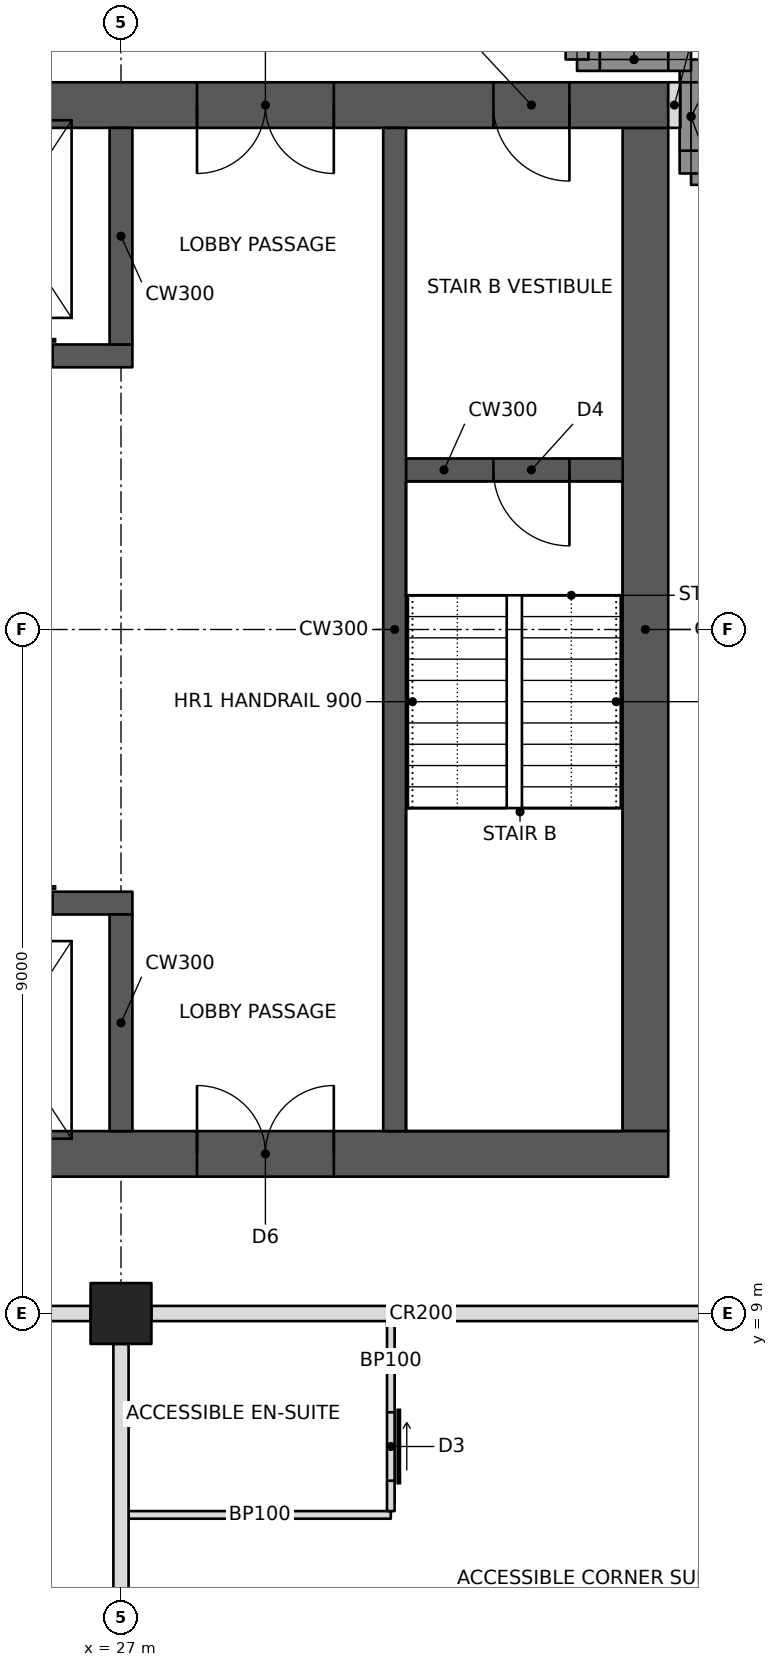
"""IFC4 building model, lengths in metres.
Left out: names, types, materials, properties, quantities, classifications, styles, units other than length and angle.
Written with IfcOpenShell. Run it as: python <this file> out.ifc"""

import sys

from ifc_helpers import new_model, si_unit, direction, frame, frame_2d, origin, origin_2d, place, context, subcontext, project, spatial, rectangle, hollow_rectangle, extrude, element, fill, save


model = new_model("IFC4")
c1 = context("Model", 3, precision=1e-05, world=origin(), true_north=direction((0.0, 1.0)))
c2 = subcontext(c1, "Body", "Model", "MODEL_VIEW")
j1 = project(units=[si_unit("LENGTHUNIT", "METRE"), si_unit("PLANEANGLEUNIT", "RADIAN")], contexts=[c1])
p1 = place(None, origin())
s1 = spatial("IfcSite", under=j1, at=p1, CompositionType="ELEMENT")
p2 = place(p1, origin())
s2 = spatial("IfcBuilding", under=s1, at=p2, CompositionType="ELEMENT")
p3 = place(p2, frame((0.0, 0.0, 266.2)))
s3 = spatial("IfcBuildingStorey", under=s2, at=p3, CompositionType="ELEMENT", Elevation=266.2)
p4 = place(p3, frame((27.0, 9.0, 0.0), z_axis=(0.0, 0.0, 1.0), x_axis=(1.0, 0.0, 0.0)))
e1 = element("IfcColumn", 1, at=p4, inside=s3, PredefinedType="COLUMN", context=c2, shape_type="SweptSolid", body=[
    extrude(hollow_rectangle(XDim=0.8, YDim=0.8, WallThickness=0.032, at=origin_2d()), origin(), (0.0, 0.0, 1.0), 3.6),
])
p5 = place(p3, frame((10.8, 11.1, 0.0), z_axis=(0.0, 0.0, 1.0), x_axis=(1.0, 0.0, 0.0)))
e2 = element("IfcWall", 2, at=p5, inside=s3, PredefinedType="SHEAR", context=c2, shape_type="SweptSolid", body=[
    extrude(rectangle(XDim=23.4, YDim=0.6, at=frame_2d((11.7, 0.0))), origin(), (0.0, 0.0, 1.0), 3.6),
])
p6 = place(p5, frame((1.0, 0.0, 0.0)))
e3 = element("IfcOpeningElement", 3, at=p6, cuts=e2, PredefinedType="OPENING", context=c2, shape_type="SweptSolid", body=[
    extrude(rectangle(XDim=1.0, YDim=2.1, at=frame_2d((0.5, 1.05))), frame((0.0, 0.31, 0.0), z_axis=(0.0, -1.0, 0.0), x_axis=(1.0, 0.0, 0.0)), (0.0, 0.0, 1.0), 0.62),
])
p7 = place(p5, frame((17.2, 0.0, 0.0)))
e4 = element("IfcOpeningElement", 4, at=p7, cuts=e2, PredefinedType="OPENING", context=c2, shape_type="SweptSolid", body=[
    extrude(rectangle(XDim=1.8, YDim=2.1, at=frame_2d((0.9, 1.05))), frame((0.0, 0.31, 0.0), z_axis=(0.0, -1.0, 0.0), x_axis=(1.0, 0.0, 0.0)), (0.0, 0.0, 1.0), 0.62),
])
p8 = place(p3, frame((10.8, 24.9, 0.0), z_axis=(0.0, 0.0, 1.0), x_axis=(1.0, 0.0, 0.0)))
e5 = element("IfcWall", 5, at=p8, inside=s3, PredefinedType="SHEAR", context=c2, shape_type="SweptSolid", body=[
    extrude(rectangle(XDim=23.4, YDim=0.6, at=frame_2d((11.7, 0.0))), origin(), (0.0, 0.0, 1.0), 3.6),
])
p9 = place(p8, frame((17.2, 0.0, 0.0)))
e6 = element("IfcOpeningElement", 6, at=p9, cuts=e5, PredefinedType="OPENING", context=c2, shape_type="SweptSolid", body=[
    extrude(rectangle(XDim=1.8, YDim=2.1, at=frame_2d((0.9, 1.05))), frame((0.0, 0.31, 0.0), z_axis=(0.0, -1.0, 0.0), x_axis=(1.0, 0.0, 0.0)), (0.0, 0.0, 1.0), 0.62),
])
p10 = place(p8, frame((21.1, 0.0, 0.0)))
e7 = element("IfcOpeningElement", 7, at=p10, cuts=e5, PredefinedType="OPENING", context=c2, shape_type="SweptSolid", body=[
    extrude(rectangle(XDim=1.0, YDim=2.1, at=frame_2d((0.5, 1.05))), frame((0.0, 0.31, 0.0), z_axis=(0.0, -1.0, 0.0), x_axis=(1.0, 0.0, 0.0)), (0.0, 0.0, 1.0), 0.62),
])
p11 = place(p8, frame((4.9, 0.0, 0.0)))
e8 = element("IfcOpeningElement", 8, at=p11, cuts=e5, PredefinedType="OPENING", context=c2, shape_type="SweptSolid", body=[
    extrude(rectangle(XDim=1.0, YDim=2.1, at=frame_2d((0.5, 1.05))), frame((0.0, 0.31, 0.0), z_axis=(0.0, -1.0, 0.0), x_axis=(1.0, 0.0, 0.0)), (0.0, 0.0, 1.0), 0.62),
])
p12 = place(p3, frame((33.9, 11.4, 0.0), z_axis=(0.0, 0.0, 1.0), x_axis=(0.0, 1.0, 0.0)))
e9 = element("IfcWall", 9, at=p12, inside=s3, PredefinedType="SHEAR", context=c2, shape_type="SweptSolid", body=[
    extrude(rectangle(XDim=13.2, YDim=0.6, at=frame_2d((6.6, 0.0))), origin(), (0.0, 0.0, 1.0), 3.6),
])
p13 = place(p3, frame((18.15, 14.4, 0.0), z_axis=(0.0, 0.0, 1.0), x_axis=(1.0, 0.0, 0.0)))
e10 = element("IfcWall", 10, at=p13, inside=s3, PredefinedType="SHEAR", context=c2, shape_type="SweptSolid", body=[
    extrude(rectangle(XDim=9.0, YDim=0.3, at=frame_2d((4.5, 0.0))), origin(), (0.0, 0.0, 1.0), 3.6),
])
p14 = place(p13, frame((0.8, 0.0, 0.0)))
e11 = element("IfcOpeningElement", 11, at=p14, cuts=e10, PredefinedType="OPENING", context=c2, shape_type="SweptSolid", body=[
    extrude(rectangle(XDim=1.1, YDim=2.1, at=frame_2d((0.55, 1.05))), frame((0.0, 0.16, 0.0), z_axis=(0.0, -1.0, 0.0), x_axis=(1.0, 0.0, 0.0)), (0.0, 0.0, 1.0), 0.32),
])
p15 = place(p13, frame((6.75, 0.0, 0.0)))
e12 = element("IfcOpeningElement", 12, at=p15, cuts=e10, PredefinedType="OPENING", context=c2, shape_type="SweptSolid", body=[
    extrude(rectangle(XDim=1.2, YDim=2.1, at=frame_2d((0.6, 1.05))), frame((0.0, 0.16, 0.0), z_axis=(0.0, -1.0, 0.0), x_axis=(1.0, 0.0, 0.0)), (0.0, 0.0, 1.0), 0.32),
])
p16 = place(p13, frame((3.8, 0.0, 0.0)))
e13 = element("IfcOpeningElement", 13, at=p16, cuts=e10, PredefinedType="OPENING", context=c2, shape_type="SweptSolid", body=[
    extrude(rectangle(XDim=1.1, YDim=2.1, at=frame_2d((0.55, 1.05))), frame((0.0, 0.16, 0.0), z_axis=(0.0, -1.0, 0.0), x_axis=(1.0, 0.0, 0.0)), (0.0, 0.0, 1.0), 0.32),
])
p17 = place(p3, frame((27.0, 11.4, 0.0), z_axis=(0.0, 0.0, 1.0), x_axis=(0.0, 1.0, 0.0)))
e14 = element("IfcWall", 14, at=p17, inside=s3, PredefinedType="SHEAR", context=c2, shape_type="SweptSolid", body=[
    extrude(rectangle(XDim=2.85, YDim=0.3, at=frame_2d((1.425, 0.0))), origin(), (0.0, 0.0, 1.0), 3.6),
])
p18 = place(p3, frame((18.15, 21.6, 0.0), z_axis=(0.0, 0.0, 1.0), x_axis=(1.0, 0.0, 0.0)))
e15 = element("IfcWall", 15, at=p18, inside=s3, PredefinedType="SHEAR", context=c2, shape_type="SweptSolid", body=[
    extrude(rectangle(XDim=9.0, YDim=0.3, at=frame_2d((4.5, 0.0))), origin(), (0.0, 0.0, 1.0), 3.6),
])
p19 = place(p18, frame((6.75, 0.0, 0.0)))
e16 = element("IfcOpeningElement", 16, at=p19, cuts=e15, PredefinedType="OPENING", context=c2, shape_type="SweptSolid", body=[
    extrude(rectangle(XDim=1.2, YDim=2.1, at=frame_2d((0.6, 1.05))), frame((0.0, 0.16, 0.0), z_axis=(0.0, -1.0, 0.0), x_axis=(1.0, 0.0, 0.0)), (0.0, 0.0, 1.0), 0.32),
])
p20 = place(p18, frame((0.8, 0.0, 0.0)))
e17 = element("IfcOpeningElement", 17, at=p20, cuts=e15, PredefinedType="OPENING", context=c2, shape_type="SweptSolid", body=[
    extrude(rectangle(XDim=1.1, YDim=2.1, at=frame_2d((0.55, 1.05))), frame((0.0, 0.16, 0.0), z_axis=(0.0, -1.0, 0.0), x_axis=(1.0, 0.0, 0.0)), (0.0, 0.0, 1.0), 0.32),
])
p21 = place(p18, frame((3.8, 0.0, 0.0)))
e18 = element("IfcOpeningElement", 18, at=p21, cuts=e15, PredefinedType="OPENING", context=c2, shape_type="SweptSolid", body=[
    extrude(rectangle(XDim=1.1, YDim=2.1, at=frame_2d((0.55, 1.05))), frame((0.0, 0.16, 0.0), z_axis=(0.0, -1.0, 0.0), x_axis=(1.0, 0.0, 0.0)), (0.0, 0.0, 1.0), 0.32),
])
p22 = place(p3, frame((27.0, 21.75, 0.0), z_axis=(0.0, 0.0, 1.0), x_axis=(0.0, 1.0, 0.0)))
e19 = element("IfcWall", 19, at=p22, inside=s3, PredefinedType="SHEAR", context=c2, shape_type="SweptSolid", body=[
    extrude(rectangle(XDim=2.85, YDim=0.3, at=frame_2d((1.425, 0.0))), origin(), (0.0, 0.0, 1.0), 3.6),
])
p23 = place(p3, frame((30.6, 11.4, 0.0), z_axis=(0.0, 0.0, 1.0), x_axis=(0.0, 1.0, 0.0)))
e20 = element("IfcWall", 20, at=p23, inside=s3, PredefinedType="SHEAR", context=c2, shape_type="SweptSolid", body=[
    extrude(rectangle(XDim=13.2, YDim=0.3, at=frame_2d((6.6, 0.0))), origin(), (0.0, 0.0, 1.0), 3.6),
])
p24 = place(p3, frame((30.75, 20.1, 0.0), z_axis=(0.0, 0.0, 1.0), x_axis=(1.0, 0.0, 0.0)))
e21 = element("IfcWall", 21, at=p24, inside=s3, PredefinedType="SHEAR", context=c2, shape_type="SweptSolid", body=[
    extrude(rectangle(XDim=2.85, YDim=0.3, at=frame_2d((1.425, 0.0))), origin(), (0.0, 0.0, 1.0), 3.6),
])
p25 = place(p24, frame((1.15, 0.0, 0.0)))
e22 = element("IfcOpeningElement", 22, at=p25, cuts=e21, PredefinedType="OPENING", context=c2, shape_type="SweptSolid", body=[
    extrude(rectangle(XDim=1.0, YDim=2.1, at=frame_2d((0.5, 1.05))), frame((0.0, 0.16, 0.0), z_axis=(0.0, -1.0, 0.0), x_axis=(1.0, 0.0, 0.0)), (0.0, 0.0, 1.0), 0.32),
])
p26 = place(p3, frame((36.0, 24.0, 0.0), z_axis=(0.0, 0.0, 1.0), x_axis=(-1.0, 0.0, 0.0)))
e23 = element("IfcWall", 23, at=p26, inside=s3, PredefinedType="SOLIDWALL", context=c2, shape_type="SweptSolid", body=[
    extrude(rectangle(XDim=1.5, YDim=0.3, at=frame_2d((0.75, 0.0))), origin(), (0.0, 0.0, 1.0), 2.57),
])
p27 = place(p3, frame((34.5, 24.0, 0.0), z_axis=(0.0, 0.0, 1.0), x_axis=(0.0, 1.0, 0.0)))
e24 = element("IfcWall", 24, at=p27, inside=s3, PredefinedType="SOLIDWALL", context=c2, shape_type="SweptSolid", body=[
    extrude(rectangle(XDim=1.5, YDim=0.3, at=frame_2d((0.75, 0.0))), origin(), (0.0, 0.0, 1.0), 3.35),
])
p28 = place(p27, frame((0.3, 0.0, 0.6)))
e25 = element("IfcOpeningElement", 25, at=p28, cuts=e24, PredefinedType="OPENING", context=c2, shape_type="SweptSolid", body=[
    extrude(rectangle(XDim=0.9, YDim=2.2, at=frame_2d((0.45, 1.1))), frame((0.0, 0.16, 0.0), z_axis=(0.0, -1.0, 0.0), x_axis=(1.0, 0.0, 0.0)), (0.0, 0.0, 1.0), 0.32),
])
p29 = place(p3, frame((34.5, 25.5, 0.0), z_axis=(0.0, 0.0, 1.0), x_axis=(-1.0, 0.0, 0.0)))
e26 = element("IfcWall", 26, at=p29, inside=s3, PredefinedType="SOLIDWALL", context=c2, shape_type="SweptSolid", body=[
    extrude(rectangle(XDim=1.5, YDim=0.3, at=frame_2d((0.75, 0.0))), origin(), (0.0, 0.0, 1.0), 3.35),
])
p30 = place(p29, frame((0.3, 0.0, 0.6)))
e27 = element("IfcOpeningElement", 27, at=p30, cuts=e26, PredefinedType="OPENING", context=c2, shape_type="SweptSolid", body=[
    extrude(rectangle(XDim=0.9, YDim=2.2, at=frame_2d((0.45, 1.1))), frame((0.0, 0.16, 0.0), z_axis=(0.0, -1.0, 0.0), x_axis=(1.0, 0.0, 0.0)), (0.0, 0.0, 1.0), 0.32),
])
p31 = place(p3, frame((33.0, 25.5, 0.0), z_axis=(0.0, 0.0, 1.0), x_axis=(0.0, 1.0, 0.0)))
e28 = element("IfcWall", 28, at=p31, inside=s3, PredefinedType="SOLIDWALL", context=c2, shape_type="SweptSolid", body=[
    extrude(rectangle(XDim=1.5, YDim=0.3, at=frame_2d((0.75, 0.0))), origin(), (0.0, 0.0, 1.0), 2.57),
])
p32 = place(p3, frame((18.4, 9.0, 0.0), z_axis=(0.0, 0.0, 1.0), x_axis=(1.0, 0.0, 0.0)))
e29 = element("IfcWall", 29, at=p32, inside=s3, PredefinedType="PARTITIONING", context=c2, shape_type="SweptSolid", body=[
    extrude(rectangle(XDim=8.2, YDim=0.2, at=frame_2d((4.1, 0.0))), origin(), (0.0, 0.0, 1.0), 2.491),
])
p33 = place(p32, frame((0.15, 0.0, 0.0)))
e30 = element("IfcOpeningElement", 30, at=p33, cuts=e29, PredefinedType="OPENING", context=c2, shape_type="SweptSolid", body=[
    extrude(rectangle(XDim=1.0, YDim=2.1, at=frame_2d((0.5, 1.05))), frame((0.0, 0.11, 0.0), z_axis=(0.0, -1.0, 0.0), x_axis=(1.0, 0.0, 0.0)), (0.0, 0.0, 1.0), 0.22),
])
p34 = place(p3, frame((27.4, 9.0, 0.0), z_axis=(0.0, 0.0, 1.0), x_axis=(1.0, 0.0, 0.0)))
e31 = element("IfcWall", 31, at=p34, inside=s3, PredefinedType="PARTITIONING", context=c2, shape_type="SweptSolid", body=[
    extrude(rectangle(XDim=8.378, YDim=0.2, at=frame_2d((4.189, 0.0))), origin(), (0.0, 0.0, 1.0), 2.491),
])
p35 = place(p34, frame((7.25, 0.0, 0.0)))
e32 = element("IfcOpeningElement", 32, at=p35, cuts=e31, PredefinedType="OPENING", context=c2, shape_type="SweptSolid", body=[
    extrude(rectangle(XDim=0.9, YDim=2.1, at=frame_2d((0.45, 1.05))), frame((0.0, 0.11, 0.0), z_axis=(0.0, -1.0, 0.0), x_axis=(1.0, 0.0, 0.0)), (0.0, 0.0, 1.0), 0.22),
])
p36 = place(p3, frame((27.0, 8.6, 0.0), z_axis=(0.0, 0.0, 1.0), x_axis=(0.0, -1.0, 0.0)))
e33 = element("IfcWall", 33, at=p36, inside=s3, PredefinedType="PARTITIONING", context=c2, shape_type="SweptSolid", body=[
    extrude(rectangle(XDim=7.6, YDim=0.2, at=frame_2d((3.8, 0.0))), origin(), (0.0, 0.0, 1.0), 2.491),
])
p37 = place(p3, frame((27.1, 6.35, 0.0), z_axis=(0.0, 0.0, 1.0), x_axis=(1.0, 0.0, 0.0)))
e34 = element("IfcWall", 34, at=p37, inside=s3, PredefinedType="PARTITIONING", context=c2, shape_type="SweptSolid", body=[
    extrude(rectangle(XDim=3.45, YDim=0.1, at=frame_2d((1.725, 0.0))), origin(), (0.0, 0.0, 1.0), 2.491),
])
p38 = place(p3, frame((30.55, 8.9, 0.0), z_axis=(0.0, 0.0, 1.0), x_axis=(0.0, -1.0, 0.0)))
e35 = element("IfcWall", 35, at=p38, inside=s3, PredefinedType="PARTITIONING", context=c2, shape_type="SweptSolid", body=[
    extrude(rectangle(XDim=2.5, YDim=0.1, at=frame_2d((1.25, 0.0))), origin(), (0.0, 0.0, 1.0), 2.491),
])
p39 = place(p38, frame((1.2, 0.0, 0.0)))
e36 = element("IfcOpeningElement", 36, at=p39, cuts=e35, PredefinedType="OPENING", context=c2, shape_type="SweptSolid", body=[
    extrude(rectangle(XDim=0.9, YDim=2.1, at=frame_2d((0.45, 1.05))), frame((0.0, 0.06, 0.0), z_axis=(0.0, -1.0, 0.0), x_axis=(1.0, 0.0, 0.0)), (0.0, 0.0, 1.0), 0.12),
])
p40 = place(p3, frame((34.2, 24.9, 0.0), z_axis=(0.0, 0.0, 1.0), x_axis=(1.0, 0.0, 0.0)))
e37 = element("IfcWall", 37, at=p40, inside=s3, PredefinedType="PARTITIONING", context=c2, shape_type="SweptSolid", body=[
    extrude(rectangle(XDim=0.16, YDim=0.6, at=frame_2d((0.08, 0.0))), origin(), (0.0, 0.0, 1.0), 3.35),
])
p41 = place(p28, origin())
e38 = element("IfcWindow", 38, at=p41, inside=s3, PartitioningType="SINGLE_PANEL", PredefinedType="WINDOW", context=c2, shape_type="SweptSolid", body=[
    extrude(rectangle(XDim=0.9, YDim=2.2, at=frame_2d((0.45, 1.1))), frame((0.0, 0.03, 0.0), z_axis=(0.0, -1.0, 0.0), x_axis=(1.0, 0.0, 0.0)), (0.0, 0.0, 1.0), 0.06),
])
fill(e25, e38)
p42 = place(p30, origin())
e39 = element("IfcWindow", 39, at=p42, inside=s3, PartitioningType="SINGLE_PANEL", PredefinedType="WINDOW", context=c2, shape_type="SweptSolid", body=[
    extrude(rectangle(XDim=0.9, YDim=2.2, at=frame_2d((0.45, 1.1))), frame((0.0, 0.03, 0.0), z_axis=(0.0, -1.0, 0.0), x_axis=(1.0, 0.0, 0.0)), (0.0, 0.0, 1.0), 0.06),
])
fill(e27, e39)
p43 = place(p39, origin())
e40 = element("IfcDoor", 40, at=p43, inside=s3, OperationType="SLIDING_TO_LEFT", PredefinedType="DOOR", context=c2, shape_type="SweptSolid", body=[
    extrude(rectangle(XDim=0.9, YDim=2.1, at=frame_2d((0.45, 1.05))), frame((0.0, 0.025, 0.0), z_axis=(0.0, -1.0, 0.0), x_axis=(1.0, 0.0, 0.0)), (0.0, 0.0, 1.0), 0.05),
])
fill(e36, e40)
p44 = place(p7, origin())
e41 = element("IfcDoor", 41, at=p44, inside=s3, OperationType="DOUBLE_DOOR_SINGLE_SWING", PredefinedType="DOOR", context=c2, shape_type="SweptSolid", body=[
    extrude(rectangle(XDim=1.8, YDim=2.1, at=frame_2d((0.9, 1.05))), frame((0.0, 0.025, 0.0), z_axis=(0.0, -1.0, 0.0), x_axis=(1.0, 0.0, 0.0)), (0.0, 0.0, 1.0), 0.05),
])
fill(e4, e41)
p45 = place(p9, frame((1.8, 0.0, 0.0), z_axis=(0.0, 0.0, 1.0), x_axis=(-1.0, 0.0, 0.0)))
e42 = element("IfcDoor", 42, at=p45, inside=s3, OperationType="DOUBLE_DOOR_SINGLE_SWING", PredefinedType="DOOR", context=c2, shape_type="SweptSolid", body=[
    extrude(rectangle(XDim=1.8, YDim=2.1, at=frame_2d((0.9, 1.05))), frame((0.0, 0.025, 0.0), z_axis=(0.0, -1.0, 0.0), x_axis=(1.0, 0.0, 0.0)), (0.0, 0.0, 1.0), 0.05),
])
fill(e6, e42)
p46 = place(p10, frame((1.0, 0.0, 0.0), z_axis=(0.0, 0.0, 1.0), x_axis=(-1.0, 0.0, 0.0)))
e43 = element("IfcDoor", 43, at=p46, inside=s3, OperationType="SINGLE_SWING_LEFT", PredefinedType="DOOR", context=c2, shape_type="SweptSolid", body=[
    extrude(rectangle(XDim=1.0, YDim=2.1, at=frame_2d((0.5, 1.05))), frame((0.0, 0.025, 0.0), z_axis=(0.0, -1.0, 0.0), x_axis=(1.0, 0.0, 0.0)), (0.0, 0.0, 1.0), 0.05),
])
fill(e7, e43)
p47 = place(p25, frame((1.0, 0.0, 0.0), z_axis=(0.0, 0.0, 1.0), x_axis=(-1.0, 0.0, 0.0)))
e44 = element("IfcDoor", 44, at=p47, inside=s3, OperationType="SINGLE_SWING_LEFT", PredefinedType="DOOR", context=c2, shape_type="SweptSolid", body=[
    extrude(rectangle(XDim=1.0, YDim=2.1, at=frame_2d((0.5, 1.05))), frame((0.0, 0.025, 0.0), z_axis=(0.0, -1.0, 0.0), x_axis=(1.0, 0.0, 0.0)), (0.0, 0.0, 1.0), 0.05),
])
fill(e22, e44)
save(model, sys.argv[1])
